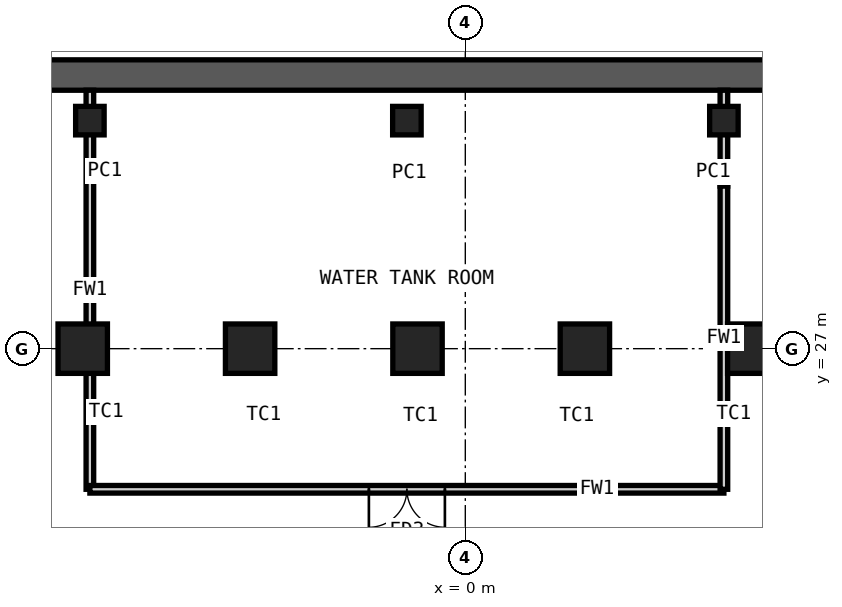
"""IFC4 building model, lengths in metres.
Left out: names, types, materials, properties, quantities, classifications, styles, units other than length and angle.
Written with IfcOpenShell. Run it as: python <this file> out.ifc"""

import sys

from ifc_helpers import new_model, si_unit, direction, frame, frame_2d, origin, origin_2d, place, context, subcontext, project, spatial, rectangle, hollow_rectangle, extrude, element, fill, save


model = new_model("IFC4")
c1 = context("Model", 3, precision=1e-05, world=origin(), true_north=direction((0.0, 1.0)))
c2 = subcontext(c1, "Body", "Model", "MODEL_VIEW")
j1 = project(units=[si_unit("LENGTHUNIT", "METRE"), si_unit("PLANEANGLEUNIT", "RADIAN")], contexts=[c1])
p1 = place(None, origin())
s1 = spatial("IfcSite", under=j1, at=p1, CompositionType="ELEMENT")
p2 = place(p1, origin())
s2 = spatial("IfcBuilding", under=s1, at=p2, CompositionType="ELEMENT")
p3 = place(p2, frame((0.0, 0.0, -12.0)))
s3 = spatial("IfcBuildingStorey", under=s2, at=p3, CompositionType="ELEMENT", Elevation=-12.0)
p4 = place(p3, frame((-18.97, 34.2, -0.2), z_axis=(0.0, 0.0, 1.0), x_axis=(1.0, 0.0, 0.0)))
e1 = element("IfcWall", 1, at=p4, inside=s3, PredefinedType="SHEAR", context=c2, shape_type="SweptSolid", body=[
    extrude(rectangle(XDim=34.755, YDim=0.8, at=frame_2d((17.377, 0.0))), origin(), (0.0, 0.0, 1.0), 6.2),
])
for number, where, z_axis, x_axis in (
    (2, (-10.067, 27.0, -0.2), (0.0, 0.0, 1.0), (-1.0, 0.0, 0.0)),
    (3, (-5.662, 27.0, -0.2), (0.0, 0.0, 1.0), (-1.0, 0.0, 0.0)),
    (4, (-1.258, 27.0, -0.2), (0.0, 0.0, 1.0), (-1.0, 0.0, 0.0)),
    (5, (3.147, 27.0, -0.2), (0.0, 0.0, 1.0), (-1.0, 0.0, 0.0)),
    (6, (7.552, 27.0, -0.2), (0.0, 0.0, 1.0), (-1.0, 0.0, 0.0)),
):
    element("IfcColumn", number, at=place(p3, frame(where, z_axis=z_axis, x_axis=x_axis)), inside=s3, PredefinedType="COLUMN", context=c2, shape_type="SweptSolid", body=[
        extrude(hollow_rectangle(XDim=1.3, YDim=1.3, WallThickness=0.1, at=origin_2d()), origin(), (0.0, 0.0, 1.0), 6.2),
    ])
for number, where, z_axis, x_axis in (
    (7, (-9.879, 33.0, -0.2), (0.0, 0.0, 1.0), (-1.0, 0.0, 0.0)),
    (8, (-1.537, 33.0, -0.2), (0.0, 0.0, 1.0), (-1.0, 0.0, 0.0)),
    (9, (6.805, 33.0, -0.2), (0.0, 0.0, 1.0), (-1.0, 0.0, 0.0)),
):
    element("IfcColumn", number, at=place(p3, frame(where, z_axis=z_axis, x_axis=x_axis)), inside=s3, PredefinedType="COLUMN", context=c2, shape_type="SweptSolid", body=[
        extrude(hollow_rectangle(XDim=0.75, YDim=0.75, WallThickness=0.036, at=origin_2d()), origin(), (0.0, 0.0, 1.0), 6.2),
    ])
p5 = place(p3, frame((-9.879, 33.8, 0.0), z_axis=(0.0, 0.0, 1.0), x_axis=(0.0, -1.0, 0.0)))
e10 = element("IfcWall", 10, at=p5, inside=s3, PredefinedType="PARTITIONING", context=c2, shape_type="SweptSolid", body=[
    extrude(rectangle(XDim=10.5, YDim=0.2, at=frame_2d((5.25, 0.0))), origin(), (0.0, 0.0, 1.0), 5.75),
])
p6 = place(p3, frame((6.805, 33.8, 0.0), z_axis=(0.0, 0.0, 1.0), x_axis=(0.0, -1.0, 0.0)))
e11 = element("IfcWall", 11, at=p6, inside=s3, PredefinedType="PARTITIONING", context=c2, shape_type="SweptSolid", body=[
    extrude(rectangle(XDim=0.78, YDim=0.2, at=frame_2d((0.39, 0.0))), origin(), (0.0, 0.0, 1.0), 5.75),
])
p7 = place(p3, frame((-9.879, 23.3, 0.0), z_axis=(0.0, 0.0, 1.0), x_axis=(1.0, 0.0, 0.0)))
e12 = element("IfcWall", 12, at=p7, inside=s3, PredefinedType="PARTITIONING", context=c2, shape_type="SweptSolid", body=[
    extrude(rectangle(XDim=16.684, YDim=0.2, at=frame_2d((8.342, 0.0))), origin(), (0.0, 0.0, 1.0), 5.75),
])
p8 = place(p7, frame((7.342, 0.0, 0.0)))
e13 = element("IfcOpeningElement", 13, at=p8, cuts=e12, PredefinedType="OPENING", context=c2, shape_type="SweptSolid", body=[
    extrude(rectangle(XDim=2.0, YDim=2.4, at=frame_2d((1.0, 1.2))), frame((0.0, 0.11, 0.0), z_axis=(0.0, -1.0, 0.0), x_axis=(1.0, 0.0, 0.0)), (0.0, 0.0, 1.0), 0.22),
])
p9 = place(p3, frame((6.805, 33.021, 0.0), z_axis=(0.0, 0.0, 1.0), x_axis=(0.0, -1.0, 0.0)))
e14 = element("IfcWall", 14, at=p9, inside=s3, PredefinedType="PARTITIONING", context=c2, shape_type="SweptSolid", body=[
    extrude(rectangle(XDim=1.743, YDim=0.2, at=frame_2d((0.872, 0.0))), origin(), (0.0, 0.0, 1.0), 4.65),
])
p10 = place(p3, frame((6.805, 31.277, 0.0), z_axis=(0.0, 0.0, 1.0), x_axis=(0.0, -1.0, 0.0)))
e15 = element("IfcWall", 15, at=p10, inside=s3, PredefinedType="PARTITIONING", context=c2, shape_type="SweptSolid", body=[
    extrude(rectangle(XDim=7.977, YDim=0.2, at=frame_2d((3.989, 0.0))), origin(), (0.0, 0.0, 1.0), 5.75),
])
p11 = place(p8, origin())
e16 = element("IfcDoor", 16, at=p11, inside=s3, OperationType="DOUBLE_DOOR_DOUBLE_SWING", PredefinedType="DOOR", context=c2, shape_type="SweptSolid", body=[
    extrude(rectangle(XDim=2.0, YDim=2.4, at=frame_2d((1.0, 1.2))), frame((0.0, 0.025, 0.0), z_axis=(0.0, -1.0, 0.0), x_axis=(1.0, 0.0, 0.0)), (0.0, 0.0, 1.0), 0.05),
])
fill(e13, e16)
save(model, sys.argv[1])
